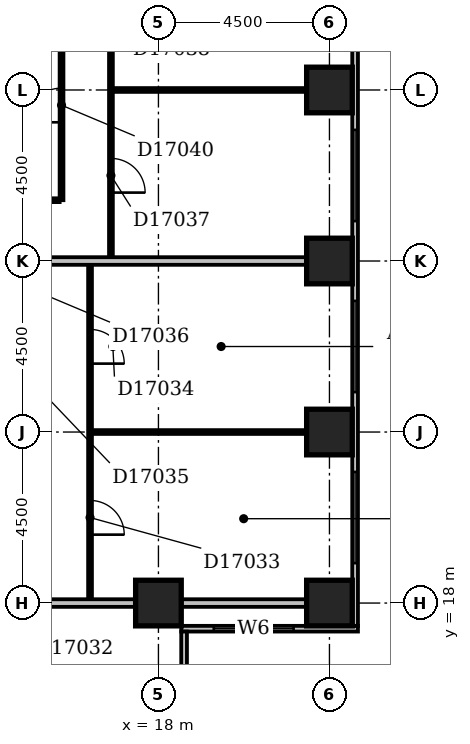
"""IFC4 building model, lengths in metres.
Left out: names, types, materials, properties, quantities, classifications, styles, units other than length and angle.
Written with IfcOpenShell. Run it as: python <this file> out.ifc"""

import sys

from ifc_helpers import new_model, si_unit, direction, frame, frame_2d, origin, origin_2d, place, context, subcontext, project, spatial, rectangle, extrude, element, fill, save


model = new_model("IFC4")
c1 = context("Model", 3, precision=1e-05, world=origin(), true_north=direction((0.0, 1.0)))
c2 = subcontext(c1, "Body", "Model", "MODEL_VIEW")
j1 = project(units=[si_unit("LENGTHUNIT", "METRE"), si_unit("PLANEANGLEUNIT", "RADIAN")], contexts=[c1])
p1 = place(None, origin())
s1 = spatial("IfcSite", under=j1, at=p1, CompositionType="ELEMENT")
p2 = place(p1, origin())
s2 = spatial("IfcBuilding", under=s1, at=p2, CompositionType="ELEMENT")
p3 = place(p2, frame((0.0, 0.0, 72.2)))
s3 = spatial("IfcBuildingStorey", under=s2, at=p3, CompositionType="ELEMENT", Elevation=72.2)
for number, where, z_axis, x_axis in (
    (1, (18.0, 18.0, -0.3), (0.0, 0.0, 1.0), (1.0, 0.0, 0.0)),
    (2, (22.5, 18.0, -0.3), (0.0, 0.0, 1.0), (1.0, 0.0, 0.0)),
    (3, (22.5, 22.5, -0.3), (0.0, 0.0, 1.0), (1.0, 0.0, 0.0)),
    (4, (22.5, 27.0, -0.3), (0.0, 0.0, 1.0), (1.0, 0.0, 0.0)),
    (5, (22.5, 31.5, -0.3), (0.0, 0.0, 1.0), (1.0, 0.0, 0.0)),
):
    element("IfcColumn", number, at=place(p3, frame(where, z_axis=z_axis, x_axis=x_axis)), inside=s3, PredefinedType="COLUMN", context=c2, shape_type="SweptSolid", body=[
        extrude(rectangle(XDim=1.2, YDim=1.2, at=origin_2d()), origin(), (0.0, 0.0, 1.0), 3.6),
    ])
p4 = place(p3, frame((18.675, 8.4, 0.0), z_axis=(0.0, 0.0, 1.0), x_axis=(0.0, 1.0, 0.0)))
e6 = element("IfcWall", 6, at=p4, inside=s3, PredefinedType="STANDARD", context=c2, shape_type="SweptSolid", body=[
    extrude(rectangle(XDim=8.85, YDim=0.15, at=frame_2d((4.425, 0.0))), origin(), (0.0, 0.0, 1.0), 2.7),
])
p5 = place(p4, frame((1.65, 0.0, 0.6)))
e7 = element("IfcOpeningElement", 7, at=p5, cuts=e6, PredefinedType="OPENING", context=c2, shape_type="SweptSolid", body=[
    extrude(rectangle(XDim=2.4, YDim=1.8, at=frame_2d((1.2, 0.9))), frame((0.0, 0.087, 0.0), z_axis=(0.0, -1.0, 0.0), x_axis=(1.0, 0.0, 0.0)), (0.0, 0.0, 1.0), 0.174),
])
p6 = place(p4, frame((5.939, 0.0, 0.6)))
e8 = element("IfcOpeningElement", 8, at=p6, cuts=e6, PredefinedType="OPENING", context=c2, shape_type="SweptSolid", body=[
    extrude(rectangle(XDim=1.2, YDim=1.8, at=frame_2d((0.6, 0.9))), frame((0.0, 0.087, 0.0), z_axis=(0.0, -1.0, 0.0), x_axis=(1.0, 0.0, 0.0)), (0.0, 0.0, 1.0), 0.174),
])
p7 = place(p3, frame((18.6, 17.325, 0.0), z_axis=(0.0, 0.0, 1.0), x_axis=(1.0, 0.0, 0.0)))
e9 = element("IfcWall", 9, at=p7, inside=s3, PredefinedType="STANDARD", context=c2, shape_type="SweptSolid", body=[
    extrude(rectangle(XDim=4.65, YDim=0.15, at=frame_2d((2.325, 0.0))), origin(), (0.0, 0.0, 1.0), 2.7),
])
p8 = place(p7, frame((0.856, 0.0, 0.6)))
e10 = element("IfcOpeningElement", 10, at=p8, cuts=e9, PredefinedType="OPENING", context=c2, shape_type="SweptSolid", body=[
    extrude(rectangle(XDim=2.1, YDim=1.8, at=frame_2d((1.05, 0.9))), frame((0.0, 0.087, 0.0), z_axis=(0.0, -1.0, 0.0), x_axis=(1.0, 0.0, 0.0)), (0.0, 0.0, 1.0), 0.174),
])
p9 = place(p3, frame((23.175, 17.4, 0.0), z_axis=(0.0, 0.0, 1.0), x_axis=(0.0, 1.0, 0.0)))
e11 = element("IfcWall", 11, at=p9, inside=s3, PredefinedType="STANDARD", context=c2, shape_type="SweptSolid", body=[
    extrude(rectangle(XDim=17.85, YDim=0.15, at=frame_2d((8.925, 0.0))), origin(), (0.0, 0.0, 1.0), 2.7),
])
p10 = place(p9, frame((1.65, 0.0, 0.6)))
e12 = element("IfcOpeningElement", 12, at=p10, cuts=e11, PredefinedType="OPENING", context=c2, shape_type="SweptSolid", body=[
    extrude(rectangle(XDim=2.4, YDim=1.8, at=frame_2d((1.2, 0.9))), frame((0.0, 0.087, 0.0), z_axis=(0.0, -1.0, 0.0), x_axis=(1.0, 0.0, 0.0)), (0.0, 0.0, 1.0), 0.174),
])
p11 = place(p9, frame((6.15, 0.0, 0.6)))
e13 = element("IfcOpeningElement", 13, at=p11, cuts=e11, PredefinedType="OPENING", context=c2, shape_type="SweptSolid", body=[
    extrude(rectangle(XDim=2.4, YDim=1.8, at=frame_2d((1.2, 0.9))), frame((0.0, 0.087, 0.0), z_axis=(0.0, -1.0, 0.0), x_axis=(1.0, 0.0, 0.0)), (0.0, 0.0, 1.0), 0.174),
])
p12 = place(p9, frame((10.65, 0.0, 0.6)))
e14 = element("IfcOpeningElement", 14, at=p12, cuts=e11, PredefinedType="OPENING", context=c2, shape_type="SweptSolid", body=[
    extrude(rectangle(XDim=2.4, YDim=1.8, at=frame_2d((1.2, 0.9))), frame((0.0, 0.087, 0.0), z_axis=(0.0, -1.0, 0.0), x_axis=(1.0, 0.0, 0.0)), (0.0, 0.0, 1.0), 0.174),
])
p13 = place(p9, frame((17.13, 0.0, 0.6)))
e15 = element("IfcOpeningElement", 15, at=p13, cuts=e11, PredefinedType="OPENING", context=c2, shape_type="SweptSolid", body=[
    extrude(rectangle(XDim=0.45, YDim=1.8, at=frame_2d((0.225, 0.9))), frame((0.0, 0.087, 0.0), z_axis=(0.0, -1.0, 0.0), x_axis=(1.0, 0.0, 0.0)), (0.0, 0.0, 1.0), 0.174),
])
p14 = place(p3, frame((9.1, 18.0, 0.0), z_axis=(0.0, 0.0, 1.0), x_axis=(1.0, 0.0, 0.0)))
e16 = element("IfcWall", 16, at=p14, inside=s3, PredefinedType="PARTITIONING", context=c2, shape_type="SweptSolid", body=[
    extrude(rectangle(XDim=8.3, YDim=0.2, at=frame_2d((4.15, 0.0))), origin(), (0.0, 0.0, 1.0), 2.6),
])
p15 = place(p3, frame((18.6, 18.0, 0.0), z_axis=(0.0, 0.0, 1.0), x_axis=(1.0, 0.0, 0.0)))
e17 = element("IfcWall", 17, at=p15, inside=s3, PredefinedType="PARTITIONING", context=c2, shape_type="SweptSolid", body=[
    extrude(rectangle(XDim=3.3, YDim=0.2, at=frame_2d((1.65, 0.0))), origin(), (0.0, 0.0, 1.0), 2.7),
])
p16 = place(p3, frame((16.2, 18.1, 0.0), z_axis=(0.0, 0.0, 1.0), x_axis=(0.0, 1.0, 0.0)))
e18 = element("IfcWall", 18, at=p16, inside=s3, PredefinedType="PARTITIONING", context=c2, shape_type="SweptSolid", body=[
    extrude(rectangle(XDim=8.8, YDim=0.1, at=frame_2d((4.4, 0.0))), origin(), (0.0, 0.0, 1.0), 3.3),
])
p17 = place(p16, frame((1.7, 0.0, 0.0)))
e19 = element("IfcOpeningElement", 19, at=p17, cuts=e18, PredefinedType="OPENING", context=c2, shape_type="SweptSolid", body=[
    extrude(rectangle(XDim=0.9, YDim=2.1, at=frame_2d((0.45, 1.05))), frame((0.0, 0.062, 0.0), z_axis=(0.0, -1.0, 0.0), x_axis=(1.0, 0.0, 0.0)), (0.0, 0.0, 1.0), 0.124),
])
p18 = place(p16, frame((6.2, 0.0, 0.0)))
e20 = element("IfcOpeningElement", 20, at=p18, cuts=e18, PredefinedType="OPENING", context=c2, shape_type="SweptSolid", body=[
    extrude(rectangle(XDim=0.9, YDim=2.1, at=frame_2d((0.45, 1.05))), frame((0.0, 0.062, 0.0), z_axis=(0.0, -1.0, 0.0), x_axis=(1.0, 0.0, 0.0)), (0.0, 0.0, 1.0), 0.124),
])
p19 = place(p3, frame((16.25, 22.5, 0.0), z_axis=(0.0, 0.0, 1.0), x_axis=(1.0, 0.0, 0.0)))
e21 = element("IfcWall", 21, at=p19, inside=s3, PredefinedType="PARTITIONING", context=c2, shape_type="SweptSolid", body=[
    extrude(rectangle(XDim=5.65, YDim=0.1, at=frame_2d((2.825, 0.0))), origin(), (0.0, 0.0, 1.0), 3.3),
])
p20 = place(p3, frame((9.1, 27.0, 0.0), z_axis=(0.0, 0.0, 1.0), x_axis=(1.0, 0.0, 0.0)))
e22 = element("IfcWall", 22, at=p20, inside=s3, PredefinedType="PARTITIONING", context=c2, shape_type="SweptSolid", body=[
    extrude(rectangle(XDim=12.8, YDim=0.2, at=frame_2d((6.4, 0.0))), origin(), (0.0, 0.0, 1.0), 2.7),
])
p21 = place(p3, frame((16.75, 27.1, 0.0), z_axis=(0.0, 0.0, 1.0), x_axis=(0.0, 1.0, 0.0)))
e23 = element("IfcWall", 23, at=p21, inside=s3, PredefinedType="PARTITIONING", context=c2, shape_type="SweptSolid", body=[
    extrude(rectangle(XDim=8.8, YDim=0.1, at=frame_2d((4.4, 0.0))), origin(), (0.0, 0.0, 1.0), 3.3),
])
p22 = place(p21, frame((1.7, 0.0, 0.0)))
e24 = element("IfcOpeningElement", 24, at=p22, cuts=e23, PredefinedType="OPENING", context=c2, shape_type="SweptSolid", body=[
    extrude(rectangle(XDim=0.9, YDim=2.1, at=frame_2d((0.45, 1.05))), frame((0.0, 0.062, 0.0), z_axis=(0.0, -1.0, 0.0), x_axis=(1.0, 0.0, 0.0)), (0.0, 0.0, 1.0), 0.124),
])
p23 = place(p21, frame((6.2, 0.0, 0.0)))
e25 = element("IfcOpeningElement", 25, at=p23, cuts=e23, PredefinedType="OPENING", context=c2, shape_type="SweptSolid", body=[
    extrude(rectangle(XDim=0.9, YDim=2.1, at=frame_2d((0.45, 1.05))), frame((0.0, 0.062, 0.0), z_axis=(0.0, -1.0, 0.0), x_axis=(1.0, 0.0, 0.0)), (0.0, 0.0, 1.0), 0.124),
])
p24 = place(p3, frame((9.1, 28.6, 0.0), z_axis=(0.0, 0.0, 1.0), x_axis=(1.0, 0.0, 0.0)))
e26 = element("IfcWall", 26, at=p24, inside=s3, PredefinedType="PARTITIONING", context=c2, shape_type="SweptSolid", body=[
    extrude(rectangle(XDim=6.3, YDim=0.1, at=frame_2d((3.15, 0.0))), origin(), (0.0, 0.0, 1.0), 3.3),
])
p25 = place(p3, frame((15.45, 28.6, 0.0), z_axis=(0.0, 0.0, 1.0), x_axis=(0.0, 1.0, 0.0)))
e27 = element("IfcWall", 27, at=p25, inside=s3, PredefinedType="PARTITIONING", context=c2, shape_type="SweptSolid", body=[
    extrude(rectangle(XDim=7.3, YDim=0.1, at=frame_2d((3.65, 0.0))), origin(), (0.0, 0.0, 1.0), 3.3),
])
p26 = place(p25, frame((5.8, 0.0, 0.0)))
e28 = element("IfcOpeningElement", 28, at=p26, cuts=e27, PredefinedType="OPENING", context=c2, shape_type="SweptSolid", body=[
    extrude(rectangle(XDim=0.8, YDim=2.1, at=frame_2d((0.4, 1.05))), frame((0.0, 0.062, 0.0), z_axis=(0.0, -1.0, 0.0), x_axis=(1.0, 0.0, 0.0)), (0.0, 0.0, 1.0), 0.124),
])
p27 = place(p25, frame((2.05, 0.0, 0.0)))
e29 = element("IfcOpeningElement", 29, at=p27, cuts=e27, PredefinedType="OPENING", context=c2, shape_type="SweptSolid", body=[
    extrude(rectangle(XDim=0.9, YDim=2.1, at=frame_2d((0.45, 1.05))), frame((0.0, 0.062, 0.0), z_axis=(0.0, -1.0, 0.0), x_axis=(1.0, 0.0, 0.0)), (0.0, 0.0, 1.0), 0.124),
])
p28 = place(p3, frame((16.8, 31.5, 0.0), z_axis=(0.0, 0.0, 1.0), x_axis=(1.0, 0.0, 0.0)))
e30 = element("IfcWall", 30, at=p28, inside=s3, PredefinedType="PARTITIONING", context=c2, shape_type="SweptSolid", body=[
    extrude(rectangle(XDim=5.1, YDim=0.1, at=frame_2d((2.55, 0.0))), origin(), (0.0, 0.0, 1.0), 3.3),
])
p29 = place(p8, origin())
e31 = element("IfcWindow", 31, at=p29, inside=s3, PartitioningType="SINGLE_PANEL", PredefinedType="WINDOW", context=c2, shape_type="SweptSolid", body=[
    extrude(rectangle(XDim=2.1, YDim=1.8, at=frame_2d((1.05, 0.9))), frame((0.0, 0.03, 0.0), z_axis=(0.0, -1.0, 0.0), x_axis=(1.0, 0.0, 0.0)), (0.0, 0.0, 1.0), 0.06),
])
fill(e10, e31)
p30 = place(p10, origin())
e32 = element("IfcWindow", 32, at=p30, inside=s3, PartitioningType="SINGLE_PANEL", PredefinedType="WINDOW", context=c2, shape_type="SweptSolid", body=[
    extrude(rectangle(XDim=2.4, YDim=1.8, at=frame_2d((1.2, 0.9))), frame((0.0, 0.03, 0.0), z_axis=(0.0, -1.0, 0.0), x_axis=(1.0, 0.0, 0.0)), (0.0, 0.0, 1.0), 0.06),
])
fill(e12, e32)
p31 = place(p11, origin())
e33 = element("IfcWindow", 33, at=p31, inside=s3, PartitioningType="SINGLE_PANEL", PredefinedType="WINDOW", context=c2, shape_type="SweptSolid", body=[
    extrude(rectangle(XDim=2.4, YDim=1.8, at=frame_2d((1.2, 0.9))), frame((0.0, 0.03, 0.0), z_axis=(0.0, -1.0, 0.0), x_axis=(1.0, 0.0, 0.0)), (0.0, 0.0, 1.0), 0.06),
])
fill(e13, e33)
p32 = place(p12, origin())
e34 = element("IfcWindow", 34, at=p32, inside=s3, PartitioningType="SINGLE_PANEL", PredefinedType="WINDOW", context=c2, shape_type="SweptSolid", body=[
    extrude(rectangle(XDim=2.4, YDim=1.8, at=frame_2d((1.2, 0.9))), frame((0.0, 0.03, 0.0), z_axis=(0.0, -1.0, 0.0), x_axis=(1.0, 0.0, 0.0)), (0.0, 0.0, 1.0), 0.06),
])
fill(e14, e34)
p33 = place(p17, frame((0.9, 0.0, 0.0), z_axis=(0.0, 0.0, 1.0), x_axis=(-1.0, 0.0, 0.0)))
e35 = element("IfcDoor", 35, at=p33, inside=s3, OperationType="SINGLE_SWING_RIGHT", PredefinedType="DOOR", context=c2, shape_type="SweptSolid", body=[
    extrude(rectangle(XDim=0.9, YDim=2.1, at=frame_2d((0.45, 1.05))), frame((0.0, 0.025, 0.0), z_axis=(0.0, -1.0, 0.0), x_axis=(1.0, 0.0, 0.0)), (0.0, 0.0, 1.0), 0.05),
])
fill(e19, e35)
p34 = place(p18, frame((0.9, 0.0, 0.0), z_axis=(0.0, 0.0, 1.0), x_axis=(-1.0, 0.0, 0.0)))
e36 = element("IfcDoor", 36, at=p34, inside=s3, OperationType="SINGLE_SWING_RIGHT", PredefinedType="DOOR", context=c2, shape_type="SweptSolid", body=[
    extrude(rectangle(XDim=0.9, YDim=2.1, at=frame_2d((0.45, 1.05))), frame((0.0, 0.025, 0.0), z_axis=(0.0, -1.0, 0.0), x_axis=(1.0, 0.0, 0.0)), (0.0, 0.0, 1.0), 0.05),
])
fill(e20, e36)
p35 = place(p22, frame((0.9, 0.0, 0.0), z_axis=(0.0, 0.0, 1.0), x_axis=(-1.0, 0.0, 0.0)))
e37 = element("IfcDoor", 37, at=p35, inside=s3, OperationType="SINGLE_SWING_RIGHT", PredefinedType="DOOR", context=c2, shape_type="SweptSolid", body=[
    extrude(rectangle(XDim=0.9, YDim=2.1, at=frame_2d((0.45, 1.05))), frame((0.0, 0.025, 0.0), z_axis=(0.0, -1.0, 0.0), x_axis=(1.0, 0.0, 0.0)), (0.0, 0.0, 1.0), 0.05),
])
fill(e24, e37)
p36 = place(p27, origin())
e38 = element("IfcDoor", 38, at=p36, inside=s3, OperationType="SINGLE_SWING_LEFT", PredefinedType="DOOR", context=c2, shape_type="SweptSolid", body=[
    extrude(rectangle(XDim=0.9, YDim=2.1, at=frame_2d((0.45, 1.05))), frame((0.0, 0.025, 0.0), z_axis=(0.0, -1.0, 0.0), x_axis=(1.0, 0.0, 0.0)), (0.0, 0.0, 1.0), 0.05),
])
fill(e29, e38)
save(model, sys.argv[1])
